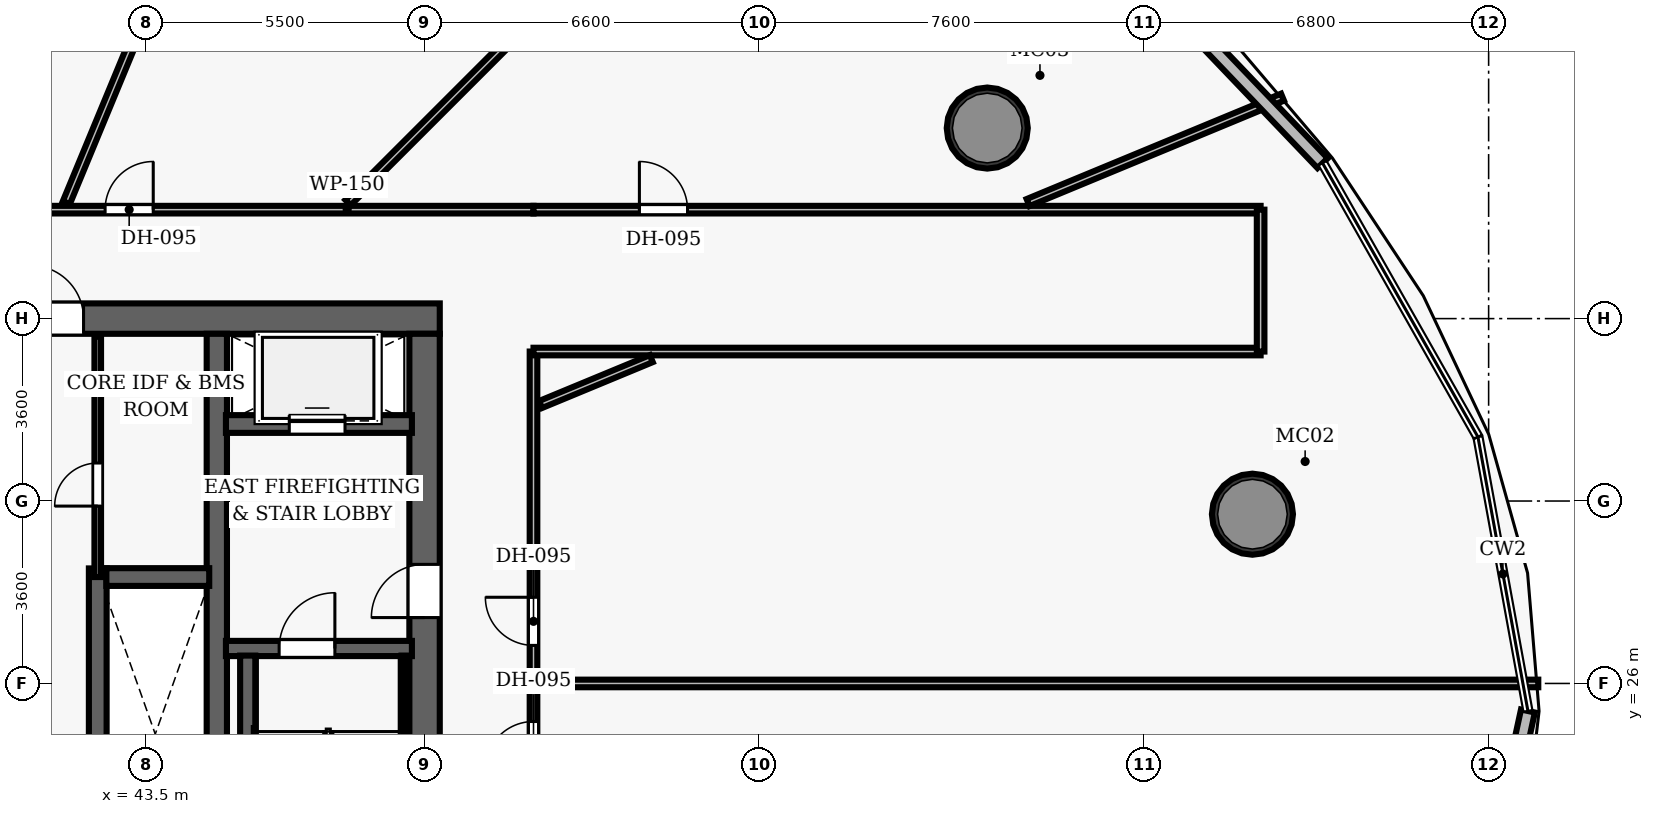
"""IFC4 building model, lengths in metres.
Left out: names, types, materials, properties, quantities, classifications, styles, units other than length and angle.
Written with IfcOpenShell. Run it as: python <this file> out.ifc"""

import sys

from ifc_helpers import new_model, si_unit, direction, frame, frame_2d, origin, origin_2d, place, context, subcontext, project, spatial, rectangle, hollow_circle, extrude, element, fill, save


model = new_model("IFC4")
c1 = context("Model", 3, precision=1e-05, world=origin(), true_north=direction((0.0, 1.0)))
c2 = subcontext(c1, "Body", "Model", "MODEL_VIEW")
j1 = project(units=[si_unit("LENGTHUNIT", "METRE"), si_unit("PLANEANGLEUNIT", "RADIAN")], contexts=[c1])
p1 = place(None, origin())
s1 = spatial("IfcSite", under=j1, at=p1, CompositionType="ELEMENT")
p2 = place(p1, origin())
s2 = spatial("IfcBuilding", under=s1, at=p2, CompositionType="ELEMENT")
p3 = place(p2, frame((0.0, 0.0, 41.4)))
s3 = spatial("IfcBuildingStorey", under=s2, at=p3, CompositionType="ELEMENT", Elevation=41.4)
p4 = place(p3, frame((26.7, 33.2, 0.0), z_axis=(0.0, 0.0, 1.0), x_axis=(1.0, 0.0, 0.0)))
e1 = element("IfcWall", 1, at=p4, inside=s3, PredefinedType="SHEAR", context=c2, shape_type="SweptSolid", body=[
    extrude(rectangle(XDim=22.6, YDim=0.6, at=frame_2d((11.3, 0.0))), origin(), (0.0, 0.0, 1.0), 3.5),
])
p5 = place(p4, frame((4.62, 0.0, 0.0)))
e2 = element("IfcOpeningElement", 2, at=p5, cuts=e1, PredefinedType="OPENING", context=c2, shape_type="SweptSolid", body=[
    extrude(rectangle(XDim=1.05, YDim=2.15, at=frame_2d((0.525, 1.075))), frame((0.0, 0.31, 0.0), z_axis=(0.0, -1.0, 0.0), x_axis=(1.0, 0.0, 0.0)), (0.0, 0.0, 1.0), 0.62),
])
p6 = place(p4, frame((14.52, 0.0, 0.0)))
e3 = element("IfcOpeningElement", 3, at=p6, cuts=e1, PredefinedType="OPENING", context=c2, shape_type="SweptSolid", body=[
    extrude(rectangle(XDim=1.05, YDim=2.15, at=frame_2d((0.525, 1.075))), frame((0.0, 0.31, 0.0), z_axis=(0.0, -1.0, 0.0), x_axis=(1.0, 0.0, 0.0)), (0.0, 0.0, 1.0), 0.62),
])
p7 = place(p3, frame((49.0, 19.1, 0.0), z_axis=(0.0, 0.0, 1.0), x_axis=(0.0, 1.0, 0.0)))
e4 = element("IfcWall", 4, at=p7, inside=s3, PredefinedType="SHEAR", context=c2, shape_type="SweptSolid", body=[
    extrude(rectangle(XDim=13.8, YDim=0.6, at=frame_2d((6.9, 0.0))), origin(), (0.0, 0.0, 1.0), 3.5),
])
p8 = place(p7, frame((8.2, 0.0, 0.0)))
e5 = element("IfcOpeningElement", 5, at=p8, cuts=e4, PredefinedType="OPENING", context=c2, shape_type="SweptSolid", body=[
    extrude(rectangle(XDim=1.05, YDim=2.15, at=frame_2d((0.525, 1.075))), frame((0.0, 0.31, 0.0), z_axis=(0.0, -1.0, 0.0), x_axis=(1.0, 0.0, 0.0)), (0.0, 0.0, 1.0), 0.62),
])
p9 = place(p3, frame((44.9, 19.1, 0.0), z_axis=(0.0, 0.0, 1.0), x_axis=(0.0, 1.0, 0.0)))
e6 = element("IfcWall", 6, at=p9, inside=s3, PredefinedType="SHEAR", context=c2, shape_type="SweptSolid", body=[
    extrude(rectangle(XDim=13.8, YDim=0.4, at=frame_2d((6.9, 0.0))), origin(), (0.0, 0.0, 1.0), 3.5),
])
for number, where, z_axis, x_axis in (
    (7, (65.339, 29.34, 0.0), (0.0, 0.0, 1.0), (1.0, 0.0, 0.0)),
    (8, (60.105, 36.96, 0.0), (0.0, 0.0, 1.0), (1.0, 0.0, 0.0)),
):
    element("IfcColumn", number, at=place(p3, frame(where, z_axis=z_axis, x_axis=x_axis)), inside=s3, PredefinedType="COLUMN", context=c2, shape_type="SweptSolid", body=[
        extrude(hollow_circle(Radius=0.8, WallThickness=0.06, at=origin_2d()), origin(), (0.0, 0.0, 1.0), 3.5),
    ])
p10 = place(p3, frame((45.08, 26.69, 0.0), z_axis=(0.0, 0.0, 1.0), x_axis=(1.0, 0.0, 0.0)))
e9 = element("IfcWall", 9, at=p10, inside=s3, PredefinedType="SHEAR", context=c2, shape_type="SweptSolid", body=[
    extrude(rectangle(XDim=3.67, YDim=0.3, at=frame_2d((1.835, 0.0))), origin(), (0.0, 0.0, 1.0), 3.5),
])
p11 = place(p10, frame((1.05, 0.0, 0.0)))
e10 = element("IfcOpeningElement", 10, at=p11, cuts=e9, PredefinedType="OPENING", context=c2, shape_type="SweptSolid", body=[
    extrude(rectangle(XDim=1.1, YDim=2.15, at=frame_2d((0.55, 1.075))), frame((0.0, 0.16, 0.0), z_axis=(0.0, -1.0, 0.0), x_axis=(1.0, 0.0, 0.0)), (0.0, 0.0, 1.0), 0.32),
])
p12 = place(p3, frame((45.51, 19.05, 0.0), z_axis=(0.0, 0.0, 1.0), x_axis=(0.0, 1.0, 0.0)))
e11 = element("IfcWall", 11, at=p12, inside=s3, PredefinedType="SHEAR", context=c2, shape_type="SweptSolid", body=[
    extrude(rectangle(XDim=7.5, YDim=0.3, at=frame_2d((3.75, 0.0))), origin(), (0.0, 0.0, 1.0), 3.5),
])
p13 = place(p3, frame((48.605, 19.1, 0.0), z_axis=(0.0, 0.0, 1.0), x_axis=(0.0, 1.0, 0.0)))
e12 = element("IfcWall", 12, at=p13, inside=s3, PredefinedType="SHEAR", context=c2, shape_type="SweptSolid", body=[
    extrude(rectangle(XDim=7.45, YDim=0.12, at=frame_2d((3.725, 0.0))), origin(), (0.0, 0.0, 1.0), 3.5),
])
p14 = place(p3, frame((45.08, 31.12, 0.0), z_axis=(0.0, 0.0, 1.0), x_axis=(1.0, 0.0, 0.0)))
e13 = element("IfcWall", 13, at=p14, inside=s3, PredefinedType="SHEAR", context=c2, shape_type="SweptSolid", body=[
    extrude(rectangle(XDim=3.67, YDim=0.35, at=frame_2d((1.835, 0.0))), origin(), (0.0, 0.0, 1.0), 2.6),
])
p15 = place(p14, frame((1.25, 0.0, 0.0)))
e14 = element("IfcOpeningElement", 14, at=p15, cuts=e13, PredefinedType="OPENING", context=c2, shape_type="SweptSolid", body=[
    extrude(rectangle(XDim=1.1, YDim=2.15, at=frame_2d((0.55, 1.075))), frame((0.0, 0.185, 0.0), z_axis=(0.0, -1.0, 0.0), x_axis=(1.0, 0.0, 0.0)), (0.0, 0.0, 1.0), 0.37),
])
p16 = place(p3, frame((42.55, 21.73, 0.0), z_axis=(0.0, 0.0, 1.0), x_axis=(0.0, 1.0, 0.0)))
e15 = element("IfcWall", 15, at=p16, inside=s3, PredefinedType="SHEAR", context=c2, shape_type="SweptSolid", body=[
    extrude(rectangle(XDim=6.54, YDim=0.35, at=frame_2d((3.27, 0.0))), origin(), (0.0, 0.0, 1.0), 2.6),
])
p17 = place(p3, frame((42.72, 28.1, 0.0), z_axis=(0.0, 0.0, 1.0), x_axis=(1.0, 0.0, 0.0)))
e16 = element("IfcWall", 16, at=p17, inside=s3, PredefinedType="SHEAR", context=c2, shape_type="SweptSolid", body=[
    extrude(rectangle(XDim=2.03, YDim=0.35, at=frame_2d((1.015, 0.0))), origin(), (0.0, 0.0, 1.0), 2.6),
])
p18 = place(p3, frame((42.55, 28.1, 0.0), z_axis=(0.0, 0.0, 1.0), x_axis=(0.0, 1.0, 0.0)))
e17 = element("IfcWall", 17, at=p18, inside=s3, PredefinedType="PARTITIONING", context=c2, shape_type="SweptSolid", body=[
    extrude(rectangle(XDim=4.75, YDim=0.13, at=frame_2d((2.375, 0.0))), origin(), (0.0, 0.0, 1.0), 2.6),
])
p19 = place(p18, frame((1.4, 0.0, 0.0)))
e18 = element("IfcOpeningElement", 18, at=p19, cuts=e17, PredefinedType="OPENING", context=c2, shape_type="SweptSolid", body=[
    extrude(rectangle(XDim=0.85, YDim=2.1, at=frame_2d((0.425, 1.05))), frame((0.0, 0.075, 0.0), z_axis=(0.0, -1.0, 0.0), x_axis=(1.0, 0.0, 0.0)), (0.0, 0.0, 1.0), 0.15),
])
p20 = place(p3, frame((27.65, 35.35, 0.0), z_axis=(0.0, 0.0, 1.0), x_axis=(1.0, 0.0, 0.0)))
e19 = element("IfcWall", 19, at=p20, inside=s3, PredefinedType="PARTITIONING", context=c2, shape_type="SweptSolid", body=[
    extrude(rectangle(XDim=23.5, YDim=0.15, at=frame_2d((11.75, 0.0))), origin(), (0.0, 0.0, 1.0), 2.6),
])
p21 = place(p20, frame((15.045, 0.0, 0.0)))
e20 = element("IfcOpeningElement", 20, at=p21, cuts=e19, PredefinedType="OPENING", context=c2, shape_type="SweptSolid", body=[
    extrude(rectangle(XDim=0.95, YDim=2.15, at=frame_2d((0.475, 1.075))), frame((0.0, 0.085, 0.0), z_axis=(0.0, -1.0, 0.0), x_axis=(1.0, 0.0, 0.0)), (0.0, 0.0, 1.0), 0.17),
])
p22 = place(p20, frame((11.159, 0.0, 0.0)))
e21 = element("IfcOpeningElement", 21, at=p22, cuts=e19, PredefinedType="OPENING", context=c2, shape_type="SweptSolid", body=[
    extrude(rectangle(XDim=0.95, YDim=2.15, at=frame_2d((0.475, 1.075))), frame((0.0, 0.085, 0.0), z_axis=(0.0, -1.0, 0.0), x_axis=(1.0, 0.0, 0.0)), (0.0, 0.0, 1.0), 0.17),
])
p23 = place(p20, frame((7.914, 0.0, 0.0)))
e22 = element("IfcOpeningElement", 22, at=p23, cuts=e19, PredefinedType="OPENING", context=c2, shape_type="SweptSolid", body=[
    extrude(rectangle(XDim=0.95, YDim=2.15, at=frame_2d((0.475, 1.075))), frame((0.0, 0.085, 0.0), z_axis=(0.0, -1.0, 0.0), x_axis=(1.0, 0.0, 0.0)), (0.0, 0.0, 1.0), 0.17),
])
p24 = place(p20, frame((4.705, 0.0, 0.0)))
e23 = element("IfcOpeningElement", 23, at=p24, cuts=e19, PredefinedType="OPENING", context=c2, shape_type="SweptSolid", body=[
    extrude(rectangle(XDim=0.95, YDim=2.15, at=frame_2d((0.475, 1.075))), frame((0.0, 0.085, 0.0), z_axis=(0.0, -1.0, 0.0), x_axis=(1.0, 0.0, 0.0)), (0.0, 0.0, 1.0), 0.17),
])
p25 = place(p3, frame((51.15, 16.65, 0.0), z_axis=(0.0, 0.0, 1.0), x_axis=(0.0, 1.0, 0.0)))
e24 = element("IfcWall", 24, at=p25, inside=s3, PredefinedType="PARTITIONING", context=c2, shape_type="SweptSolid", body=[
    extrude(rectangle(XDim=15.9, YDim=0.15, at=frame_2d((7.95, 0.0))), origin(), (0.0, 0.0, 1.0), 2.6),
])
p26 = place(p25, frame((10.101, 0.0, 0.0)))
e25 = element("IfcOpeningElement", 25, at=p26, cuts=e24, PredefinedType="OPENING", context=c2, shape_type="SweptSolid", body=[
    extrude(rectangle(XDim=0.95, YDim=2.15, at=frame_2d((0.475, 1.075))), frame((0.0, 0.085, 0.0), z_axis=(0.0, -1.0, 0.0), x_axis=(1.0, 0.0, 0.0)), (0.0, 0.0, 1.0), 0.17),
])
p27 = place(p25, frame((2.637, 0.0, 0.0)))
e26 = element("IfcOpeningElement", 26, at=p27, cuts=e24, PredefinedType="OPENING", context=c2, shape_type="SweptSolid", body=[
    extrude(rectangle(XDim=0.95, YDim=2.15, at=frame_2d((0.475, 1.075))), frame((0.0, 0.085, 0.0), z_axis=(0.0, -1.0, 0.0), x_axis=(1.0, 0.0, 0.0)), (0.0, 0.0, 1.0), 0.17),
])
p28 = place(p25, frame((7.649, 0.0, 0.0)))
e27 = element("IfcOpeningElement", 27, at=p28, cuts=e24, PredefinedType="OPENING", context=c2, shape_type="SweptSolid", body=[
    extrude(rectangle(XDim=0.95, YDim=2.15, at=frame_2d((0.475, 1.075))), frame((0.0, 0.085, 0.0), z_axis=(0.0, -1.0, 0.0), x_axis=(1.0, 0.0, 0.0)), (0.0, 0.0, 1.0), 0.17),
])
p29 = place(p3, frame((51.15, 35.35, 0.0), z_axis=(0.0, 0.0, 1.0), x_axis=(1.0, 0.0, 0.0)))
e28 = element("IfcWall", 28, at=p29, inside=s3, PredefinedType="PARTITIONING", context=c2, shape_type="SweptSolid", body=[
    extrude(rectangle(XDim=14.35, YDim=0.15, at=frame_2d((7.175, 0.0))), origin(), (0.0, 0.0, 1.0), 2.6),
])
p30 = place(p29, frame((2.09, 0.0, 0.0)))
e29 = element("IfcOpeningElement", 29, at=p30, cuts=e28, PredefinedType="OPENING", context=c2, shape_type="SweptSolid", body=[
    extrude(rectangle(XDim=0.95, YDim=2.15, at=frame_2d((0.475, 1.075))), frame((0.0, 0.085, 0.0), z_axis=(0.0, -1.0, 0.0), x_axis=(1.0, 0.0, 0.0)), (0.0, 0.0, 1.0), 0.17),
])
p31 = place(p3, frame((51.15, 32.55, 0.0), z_axis=(0.0, 0.0, 1.0), x_axis=(1.0, 0.0, 0.0)))
e30 = element("IfcWall", 30, at=p31, inside=s3, PredefinedType="PARTITIONING", context=c2, shape_type="SweptSolid", body=[
    extrude(rectangle(XDim=14.35, YDim=0.15, at=frame_2d((7.175, 0.0))), origin(), (0.0, 0.0, 1.0), 2.6),
])
p32 = place(p3, frame((65.5, 32.55, 0.0), z_axis=(0.0, 0.0, 1.0), x_axis=(0.0, 1.0, 0.0)))
e31 = element("IfcWall", 31, at=p32, inside=s3, PredefinedType="PARTITIONING", context=c2, shape_type="SweptSolid", body=[
    extrude(rectangle(XDim=2.8, YDim=0.15, at=frame_2d((1.4, 0.0))), origin(), (0.0, 0.0, 1.0), 2.6),
])
p33 = place(p3, frame((51.29, 26.0, 0.0), z_axis=(0.0, 0.0, 1.0), x_axis=(1.0, 0.0, 0.0)))
e32 = element("IfcWall", 32, at=p33, inside=s3, PredefinedType="PARTITIONING", context=c2, shape_type="SweptSolid", body=[
    extrude(rectangle(XDim=19.69, YDim=0.15, at=frame_2d((9.845, 0.0))), origin(), (0.0, 0.0, 1.0), 2.6),
])
p34 = place(p3, frame((51.29, 31.505, 0.0), z_axis=(0.0, 0.0, 1.0), x_axis=(0.923887247067, 0.382664807249, 0.0)))
e33 = element("IfcWall", 33, at=p34, inside=s3, PredefinedType="PARTITIONING", context=c2, shape_type="SweptSolid", body=[
    extrude(rectangle(XDim=2.365, YDim=0.15, at=frame_2d((1.183, 0.0))), origin(), (0.0, 0.0, 1.0), 2.6),
])
p35 = place(p3, frame((60.911, 35.49, 0.0), z_axis=(0.0, 0.0, 1.0), x_axis=(0.923872299408, 0.382700894154, 0.0)))
e34 = element("IfcWall", 34, at=p35, inside=s3, PredefinedType="PARTITIONING", context=c2, shape_type="SweptSolid", body=[
    extrude(rectangle(XDim=5.435, YDim=0.15, at=frame_2d((2.718, 0.0))), origin(), (0.0, 0.0, 1.0), 2.6),
])
p36 = place(p3, frame((47.49, 35.49, 0.0), z_axis=(0.0, 0.0, 1.0), x_axis=(0.707106781187, 0.707106781187, 0.0)))
e35 = element("IfcWall", 35, at=p36, inside=s3, PredefinedType="PARTITIONING", context=c2, shape_type="SweptSolid", body=[
    extrude(rectangle(XDim=13.571, YDim=0.15, at=frame_2d((6.786, 0.0))), origin(), (0.0, 0.0, 1.0), 2.6),
])
p37 = place(p3, frame((41.931, 35.49, 0.0), z_axis=(0.0, 0.0, 1.0), x_axis=(0.382684181613, 0.923879222162, 0.0)))
e36 = element("IfcWall", 36, at=p37, inside=s3, PredefinedType="PARTITIONING", context=c2, shape_type="SweptSolid", body=[
    extrude(rectangle(XDim=14.898, YDim=0.15, at=frame_2d((7.449, 0.0))), origin(), (0.0, 0.0, 1.0), 2.6),
])
p38 = place(p3, frame((61.79, 41.433, 0.0), z_axis=(0.0, 0.0, 1.0), x_axis=(0.690737462513, -0.723105633971, 0.0)))
e37 = element("IfcWall", 37, at=p38, inside=s3, PredefinedType="SOLIDWALL", context=c2, shape_type="SweptSolid", body=[
    extrude(rectangle(XDim=7.143, YDim=0.28, at=frame_2d((3.571, 0.0))), origin(), (0.0, 0.0, 1.0), 3.25),
])
p39 = place(p3, frame((70.775, 25.457, 0.0), z_axis=(0.0, 0.0, 1.0), x_axis=(-0.211966847204, -0.977276857235, 0.0)))
e38 = element("IfcWall", 38, at=p39, inside=s3, PredefinedType="SOLIDWALL", context=c2, shape_type="SweptSolid", body=[
    extrude(rectangle(XDim=5.498, YDim=0.28, at=frame_2d((2.749, 0.0))), origin(), (0.0, 0.0, 1.0), 3.25),
])
p40 = place(p11, origin())
e39 = element("IfcDoor", 39, at=p40, inside=s3, OperationType="SINGLE_SWING_RIGHT", PredefinedType="DOOR", context=c2, shape_type="SweptSolid", body=[
    extrude(rectangle(XDim=1.1, YDim=2.15, at=frame_2d((0.55, 1.075))), frame((0.0, 0.025, 0.0), z_axis=(0.0, -1.0, 0.0), x_axis=(1.0, 0.0, 0.0)), (0.0, 0.0, 1.0), 0.05),
])
fill(e10, e39)
p41 = place(p8, origin())
e40 = element("IfcDoor", 40, at=p41, inside=s3, OperationType="SINGLE_SWING_LEFT", PredefinedType="DOOR", context=c2, shape_type="SweptSolid", body=[
    extrude(rectangle(XDim=1.05, YDim=2.15, at=frame_2d((0.525, 1.075))), frame((0.0, 0.025, 0.0), z_axis=(0.0, -1.0, 0.0), x_axis=(1.0, 0.0, 0.0)), (0.0, 0.0, 1.0), 0.05),
])
fill(e5, e40)
p42 = place(p6, origin())
e41 = element("IfcDoor", 41, at=p42, inside=s3, OperationType="SINGLE_SWING_LEFT", PredefinedType="DOOR", context=c2, shape_type="SweptSolid", body=[
    extrude(rectangle(XDim=1.05, YDim=2.15, at=frame_2d((0.525, 1.075))), frame((0.0, 0.025, 0.0), z_axis=(0.0, -1.0, 0.0), x_axis=(1.0, 0.0, 0.0)), (0.0, 0.0, 1.0), 0.05),
])
fill(e3, e41)
p43 = place(p19, origin())
e42 = element("IfcDoor", 42, at=p43, inside=s3, OperationType="SINGLE_SWING_LEFT", PredefinedType="DOOR", context=c2, shape_type="SweptSolid", body=[
    extrude(rectangle(XDim=0.85, YDim=2.1, at=frame_2d((0.425, 1.05))), frame((0.0, 0.025, 0.0), z_axis=(0.0, -1.0, 0.0), x_axis=(1.0, 0.0, 0.0)), (0.0, 0.0, 1.0), 0.05),
])
fill(e18, e42)
p44 = place(p26, origin())
e43 = element("IfcDoor", 43, at=p44, inside=s3, OperationType="SINGLE_SWING_RIGHT", PredefinedType="DOOR", context=c2, shape_type="SweptSolid", body=[
    extrude(rectangle(XDim=0.95, YDim=2.15, at=frame_2d((0.475, 1.075))), frame((0.0, 0.025, 0.0), z_axis=(0.0, -1.0, 0.0), x_axis=(1.0, 0.0, 0.0)), (0.0, 0.0, 1.0), 0.05),
])
fill(e25, e43)
p45 = place(p30, origin())
e44 = element("IfcDoor", 44, at=p45, inside=s3, OperationType="SINGLE_SWING_LEFT", PredefinedType="DOOR", context=c2, shape_type="SweptSolid", body=[
    extrude(rectangle(XDim=0.95, YDim=2.15, at=frame_2d((0.475, 1.075))), frame((0.0, 0.025, 0.0), z_axis=(0.0, -1.0, 0.0), x_axis=(1.0, 0.0, 0.0)), (0.0, 0.0, 1.0), 0.05),
])
fill(e29, e44)
p46 = place(p21, origin())
e45 = element("IfcDoor", 45, at=p46, inside=s3, OperationType="SINGLE_SWING_RIGHT", PredefinedType="DOOR", context=c2, shape_type="SweptSolid", body=[
    extrude(rectangle(XDim=0.95, YDim=2.15, at=frame_2d((0.475, 1.075))), frame((0.0, 0.025, 0.0), z_axis=(0.0, -1.0, 0.0), x_axis=(1.0, 0.0, 0.0)), (0.0, 0.0, 1.0), 0.05),
])
fill(e20, e45)
p47 = place(p28, origin())
e46 = element("IfcDoor", 46, at=p47, inside=s3, OperationType="SINGLE_SWING_LEFT", PredefinedType="DOOR", context=c2, shape_type="SweptSolid", body=[
    extrude(rectangle(XDim=0.95, YDim=2.15, at=frame_2d((0.475, 1.075))), frame((0.0, 0.025, 0.0), z_axis=(0.0, -1.0, 0.0), x_axis=(1.0, 0.0, 0.0)), (0.0, 0.0, 1.0), 0.05),
])
fill(e27, e46)
p48 = place(p15, origin())
e47 = element("IfcDoor", 47, at=p48, inside=s3, OperationType="SLIDING_TO_LEFT", PredefinedType="DOOR", context=c2, shape_type="SweptSolid", body=[
    extrude(rectangle(XDim=1.1, YDim=2.15, at=frame_2d((0.55, 1.075))), frame((0.0, 0.025, 0.0), z_axis=(0.0, -1.0, 0.0), x_axis=(1.0, 0.0, 0.0)), (0.0, 0.0, 1.0), 0.05),
])
fill(e14, e47)
save(model, sys.argv[1])
